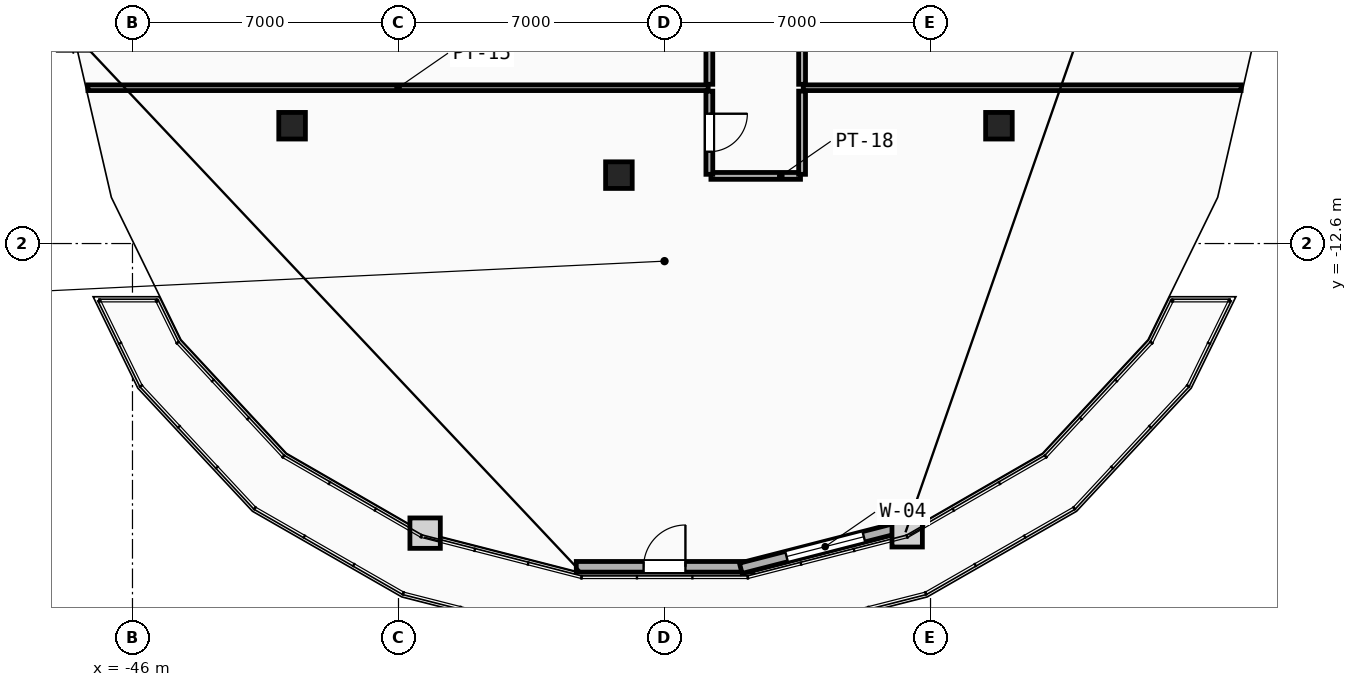
"""IFC4 building model, lengths in metres.
Left out: names, types, materials, properties, quantities, classifications, styles, units other than length and angle.
Written with IfcOpenShell. Run it as: python <this file> out.ifc"""

import sys

from ifc_helpers import new_model, si_unit, direction, frame, frame_2d, origin, origin_2d, place, context, subcontext, project, spatial, rectangle, extrude, element, fill, save


model = new_model("IFC4")
c1 = context("Model", 3, precision=1e-05, world=origin(), true_north=direction((0.0, 1.0)))
c2 = subcontext(c1, "Body", "Model", "MODEL_VIEW")
j1 = project(units=[si_unit("LENGTHUNIT", "METRE"), si_unit("PLANEANGLEUNIT", "RADIAN")], contexts=[c1])
p1 = place(None, origin())
s1 = spatial("IfcSite", under=j1, at=p1, CompositionType="ELEMENT")
p2 = place(p1, origin())
s2 = spatial("IfcBuilding", under=s1, at=p2, CompositionType="ELEMENT")
p3 = place(p2, frame((0.0, 0.0, 279.2)))
s3 = spatial("IfcBuildingStorey", under=s2, at=p3, CompositionType="ELEMENT", Elevation=279.2)
for number, where, z_axis, x_axis in (
    (1, (-41.8, -9.5, 0.0), (0.0, 0.0, 1.0), (1.0, 0.0, 0.0)),
    (2, (-33.2, -10.8, 0.0), (0.0, 0.0, 1.0), (1.0, 0.0, 0.0)),
    (3, (-23.2, -9.5, 0.0), (0.0, 0.0, 1.0), (1.0, 0.0, 0.0)),
):
    element("IfcColumn", number, at=place(p3, frame(where, z_axis=z_axis, x_axis=x_axis)), inside=s3, PredefinedType="COLUMN", context=c2, shape_type="SweptSolid", body=[
        extrude(rectangle(XDim=0.7, YDim=0.7, at=origin_2d()), origin(), (0.0, 0.0, 1.0), 3.6),
    ])
p4 = place(p3, frame((-34.322, -21.106, 0.0), z_axis=(0.0, 0.0, 1.0), x_axis=(1.0, 0.0, 0.0)))
e4 = element("IfcWall", 4, at=p4, inside=s3, PredefinedType="SOLIDWALL", context=c2, shape_type="SweptSolid", body=[
    extrude(rectangle(XDim=4.644, YDim=0.28, at=frame_2d((2.322, 0.0))), origin(), (0.0, 0.0, 1.0), 3.34),
])
p5 = place(p4, frame((1.772, 0.0, 0.0)))
e5 = element("IfcOpeningElement", 5, at=p5, cuts=e4, PredefinedType="OPENING", context=c2, shape_type="SweptSolid", body=[
    extrude(rectangle(XDim=1.1, YDim=2.2, at=frame_2d((0.55, 1.1))), frame((0.0, 0.15, 0.0), z_axis=(0.0, -1.0, 0.0), x_axis=(1.0, 0.0, 0.0)), (0.0, 0.0, 1.0), 0.3),
])
p6 = place(p3, frame((-29.993, -21.146, 0.0), z_axis=(0.0, 0.0, 1.0), x_axis=(0.968658938671, 0.248394566232, 0.0)))
e6 = element("IfcWall", 6, at=p6, inside=s3, PredefinedType="SOLIDWALL", context=c2, shape_type="SweptSolid", body=[
    extrude(rectangle(XDim=4.585, YDim=0.28, at=frame_2d((2.292, 0.0))), origin(), (0.0, 0.0, 1.0), 3.34),
])
p7 = place(p6, frame((1.243, 0.0, 0.3)))
e7 = element("IfcOpeningElement", 7, at=p7, cuts=e6, PredefinedType="OPENING", context=c2, shape_type="SweptSolid", body=[
    extrude(rectangle(XDim=2.1, YDim=2.6, at=frame_2d((1.05, 1.3))), frame((0.0, 0.15, 0.0), z_axis=(0.0, -1.0, 0.0), x_axis=(1.0, 0.0, 0.0)), (0.0, 0.0, 1.0), 0.3),
])
p8 = place(p3, frame((-47.172, -8.5, 0.0), z_axis=(0.0, 0.0, 1.0), x_axis=(1.0, 0.0, 0.0)))
e8 = element("IfcWall", 8, at=p8, inside=s3, PredefinedType="PARTITIONING", context=c2, shape_type="SweptSolid", body=[
    extrude(rectangle(XDim=16.322, YDim=0.15, at=frame_2d((8.161, 0.0))), origin(), (0.0, 0.0, 1.0), 3.34),
])
p9 = place(p3, frame((-28.35, -8.5, 0.0), z_axis=(0.0, 0.0, 1.0), x_axis=(1.0, 0.0, 0.0)))
e9 = element("IfcWall", 9, at=p9, inside=s3, PredefinedType="PARTITIONING", context=c2, shape_type="SweptSolid", body=[
    extrude(rectangle(XDim=11.522, YDim=0.15, at=frame_2d((5.761, 0.0))), origin(), (0.0, 0.0, 1.0), 3.34),
])
p10 = place(p3, frame((-30.779, -10.82, 0.0), z_axis=(0.0, 0.0, 1.0), x_axis=(1.0, 0.0, 0.0)))
e10 = element("IfcWall", 10, at=p10, inside=s3, PredefinedType="PARTITIONING", context=c2, shape_type="SweptSolid", body=[
    extrude(rectangle(XDim=2.357, YDim=0.18, at=frame_2d((1.179, 0.0))), origin(), (0.0, 0.0, 1.0), 3.34),
])
p11 = place(p3, frame((-30.82, -8.59, 0.0), z_axis=(0.0, 0.0, 1.0), x_axis=(0.0, -1.0, 0.0)))
e11 = element("IfcWall", 11, at=p11, inside=s3, PredefinedType="PARTITIONING", context=c2, shape_type="SweptSolid", body=[
    extrude(rectangle(XDim=2.188, YDim=0.18, at=frame_2d((1.094, 0.0))), origin(), (0.0, 0.0, 1.0), 3.34),
])
p12 = place(p11, frame((0.594, 0.0, 0.0)))
e12 = element("IfcOpeningElement", 12, at=p12, cuts=e11, PredefinedType="OPENING", context=c2, shape_type="SweptSolid", body=[
    extrude(rectangle(XDim=1.0, YDim=2.15, at=frame_2d((0.5, 1.075))), frame((0.0, 0.1, 0.0), z_axis=(0.0, -1.0, 0.0), x_axis=(1.0, 0.0, 0.0)), (0.0, 0.0, 1.0), 0.2),
])
p13 = place(p3, frame((-28.38, -10.779, 0.0), z_axis=(0.0, 0.0, 1.0), x_axis=(0.0, 1.0, 0.0)))
e13 = element("IfcWall", 13, at=p13, inside=s3, PredefinedType="PARTITIONING", context=c2, shape_type="SweptSolid", body=[
    extrude(rectangle(XDim=2.188, YDim=0.18, at=frame_2d((1.094, 0.0))), origin(), (0.0, 0.0, 1.0), 3.34),
])
p14 = place(p3, frame((-30.82, -0.45, 0.0), z_axis=(0.0, 0.0, 1.0), x_axis=(0.0, -1.0, 0.0)))
e14 = element("IfcWall", 14, at=p14, inside=s3, PredefinedType="PARTITIONING", context=c2, shape_type="SweptSolid", body=[
    extrude(rectangle(XDim=7.96, YDim=0.18, at=frame_2d((3.98, 0.0))), origin(), (0.0, 0.0, 1.0), 3.34),
])
p15 = place(p14, frame((3.48, 0.0, 0.0)))
e15 = element("IfcOpeningElement", 15, at=p15, cuts=e14, PredefinedType="OPENING", context=c2, shape_type="SweptSolid", body=[
    extrude(rectangle(XDim=1.0, YDim=2.15, at=frame_2d((0.5, 1.075))), frame((0.0, 0.1, 0.0), z_axis=(0.0, -1.0, 0.0), x_axis=(1.0, 0.0, 0.0)), (0.0, 0.0, 1.0), 0.2),
])
p16 = place(p3, frame((-28.38, -8.41, 0.0), z_axis=(0.0, 0.0, 1.0), x_axis=(0.0, 1.0, 0.0)))
e16 = element("IfcWall", 16, at=p16, inside=s3, PredefinedType="PARTITIONING", context=c2, shape_type="SweptSolid", body=[
    extrude(rectangle(XDim=7.96, YDim=0.18, at=frame_2d((3.98, 0.0))), origin(), (0.0, 0.0, 1.0), 3.34),
])
p17 = place(p16, frame((3.48, 0.0, 0.0)))
e17 = element("IfcOpeningElement", 17, at=p17, cuts=e16, PredefinedType="OPENING", context=c2, shape_type="SweptSolid", body=[
    extrude(rectangle(XDim=1.0, YDim=2.15, at=frame_2d((0.5, 1.075))), frame((0.0, 0.1, 0.0), z_axis=(0.0, -1.0, 0.0), x_axis=(1.0, 0.0, 0.0)), (0.0, 0.0, 1.0), 0.2),
])
p18 = place(p5, origin())
e18 = element("IfcDoor", 18, at=p18, inside=s3, OperationType="SINGLE_SWING_RIGHT", PredefinedType="DOOR", context=c2, shape_type="SweptSolid", body=[
    extrude(rectangle(XDim=1.1, YDim=2.2, at=frame_2d((0.55, 1.1))), frame((0.0, 0.025, 0.0), z_axis=(0.0, -1.0, 0.0), x_axis=(1.0, 0.0, 0.0)), (0.0, 0.0, 1.0), 0.05),
])
fill(e5, e18)
p19 = place(p7, origin())
e19 = element("IfcWindow", 19, at=p19, inside=s3, PartitioningType="SINGLE_PANEL", PredefinedType="WINDOW", context=c2, shape_type="SweptSolid", body=[
    extrude(rectangle(XDim=2.1, YDim=2.6, at=frame_2d((1.05, 1.3))), frame((0.0, 0.03, 0.0), z_axis=(0.0, -1.0, 0.0), x_axis=(1.0, 0.0, 0.0)), (0.0, 0.0, 1.0), 0.06),
])
fill(e7, e19)
p20 = place(p12, origin())
e20 = element("IfcDoor", 20, at=p20, inside=s3, OperationType="SINGLE_SWING_LEFT", PredefinedType="DOOR", context=c2, shape_type="SweptSolid", body=[
    extrude(rectangle(XDim=1.0, YDim=2.15, at=frame_2d((0.5, 1.075))), frame((0.0, 0.025, 0.0), z_axis=(0.0, -1.0, 0.0), x_axis=(1.0, 0.0, 0.0)), (0.0, 0.0, 1.0), 0.05),
])
fill(e12, e20)
save(model, sys.argv[1])
